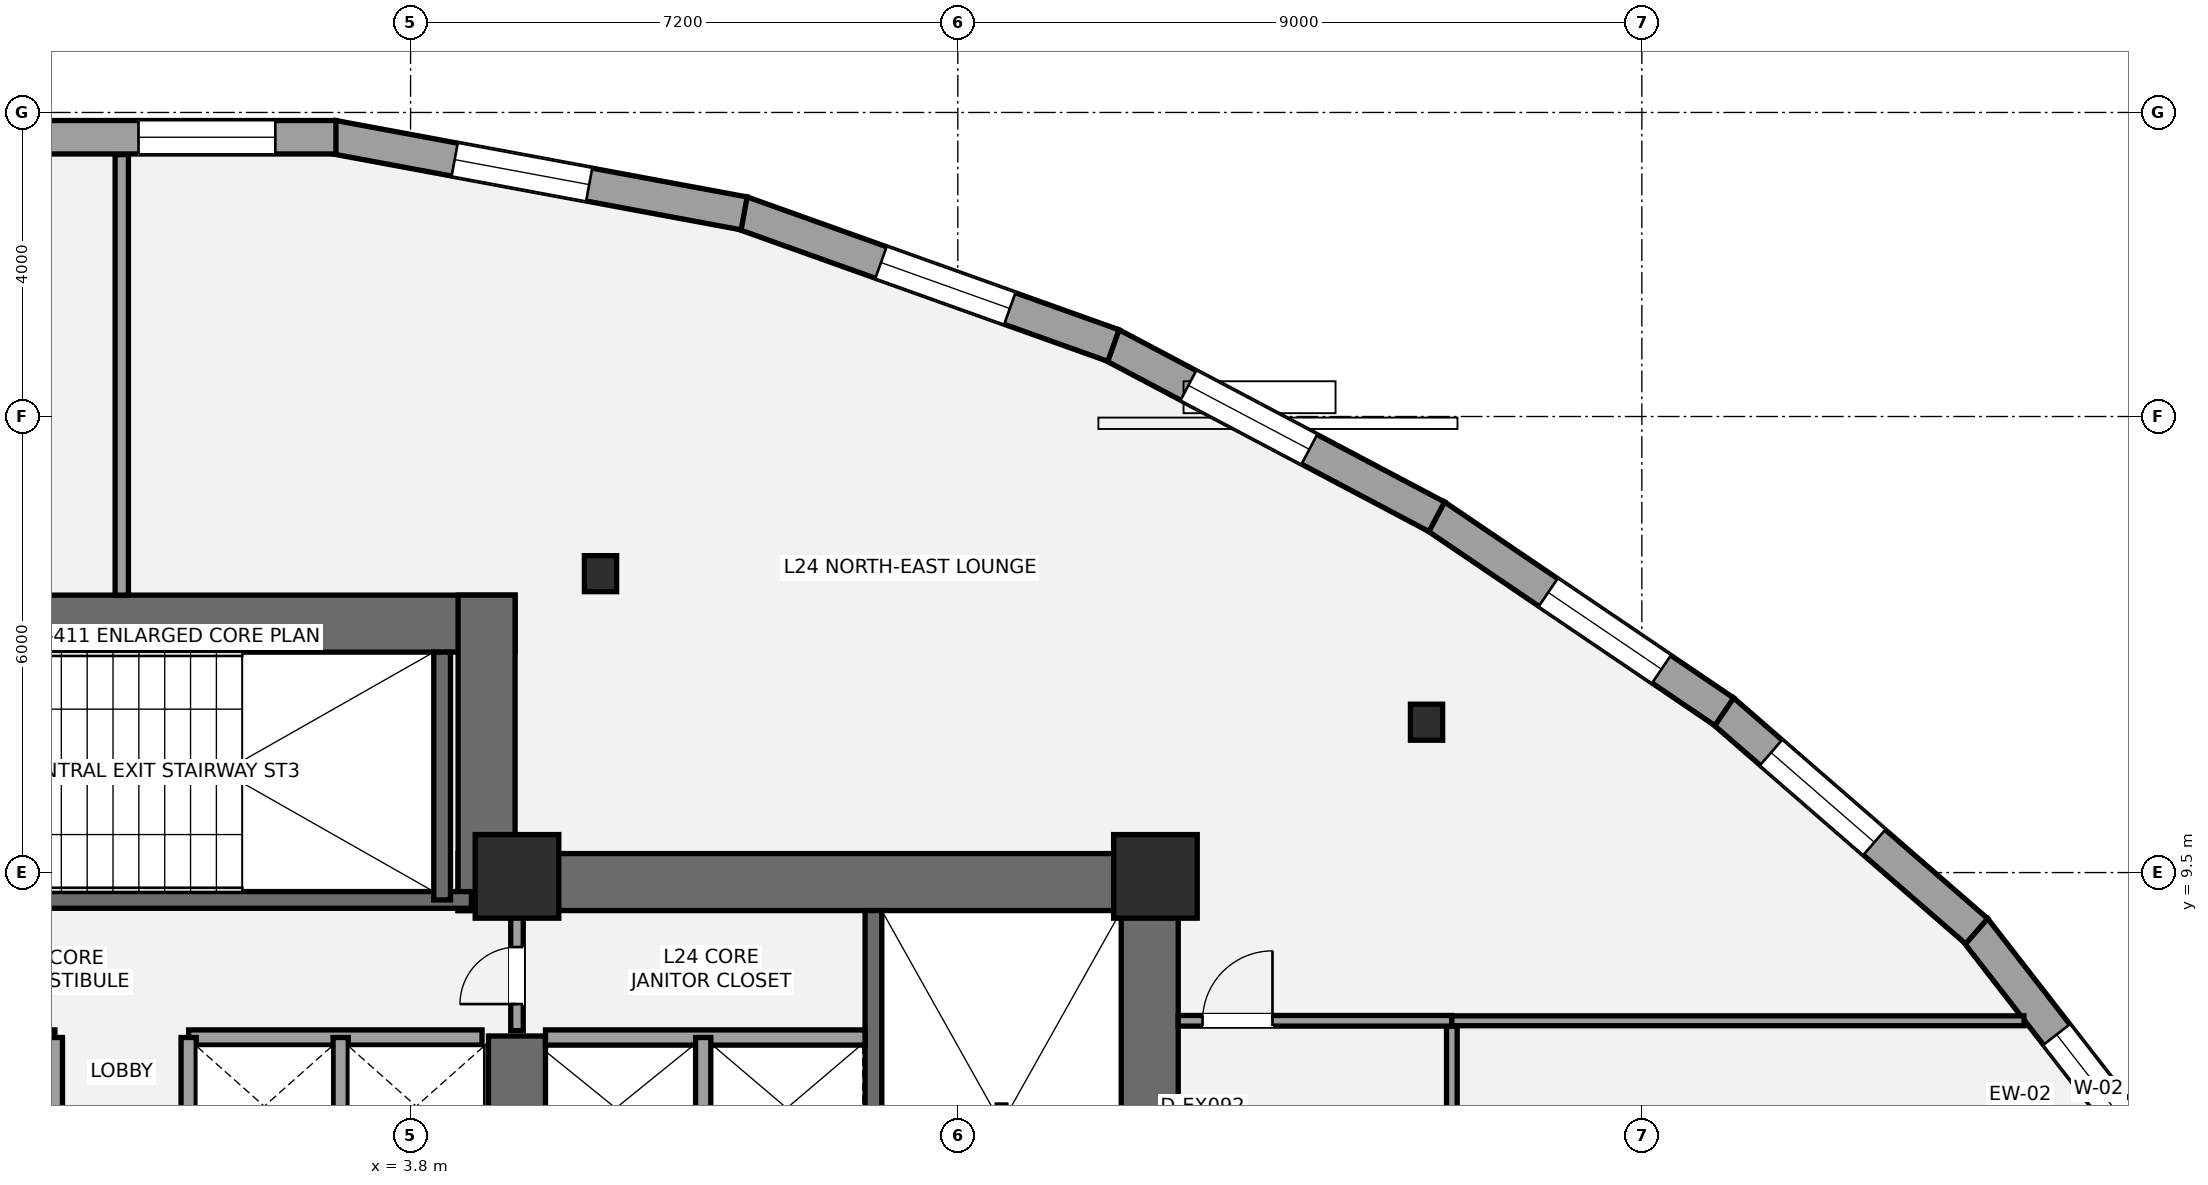
"""IFC4 building model, lengths in metres.
Left out: names, types, materials, properties, quantities, classifications, styles, units other than length and angle.
Written with IfcOpenShell. Run it as: python <this file> out.ifc"""

import sys

from ifc_helpers import new_model, si_unit, direction, frame, frame_2d, origin, origin_2d, place, context, subcontext, project, spatial, rectangle, i_section, extrude, element, fill, save


model = new_model("IFC4")
c1 = context("Model", 3, precision=1e-05, world=origin(), true_north=direction((0.0, 1.0)))
c2 = subcontext(c1, "Body", "Model", "MODEL_VIEW")
j1 = project(units=[si_unit("LENGTHUNIT", "METRE"), si_unit("PLANEANGLEUNIT", "RADIAN")], contexts=[c1])
p1 = place(None, origin())
s1 = spatial("IfcSite", under=j1, at=p1, CompositionType="ELEMENT")
p2 = place(p1, origin())
s2 = spatial("IfcBuilding", under=s1, at=p2, CompositionType="ELEMENT")
p3 = place(p2, frame((0.0, 0.0, 93.1)))
s3 = spatial("IfcBuildingStorey", under=s2, at=p3, CompositionType="ELEMENT", Elevation=93.1)
p4 = place(p3, frame((13.525, 1.1, 0.0), z_axis=(0.0, 0.0, 1.0), x_axis=(0.0, 1.0, 0.0)))
e1 = element("IfcWall", 1, at=p4, inside=s3, PredefinedType="SHEAR", context=c2, shape_type="SweptSolid", body=[
    extrude(rectangle(XDim=8.65, YDim=0.75, at=frame_2d((4.325, 0.0))), origin(), (0.0, 0.0, 1.0), 3.5),
])
p5 = place(p3, frame((4.425, 9.375, 0.0), z_axis=(0.0, 0.0, 1.0), x_axis=(1.0, 0.0, 0.0)))
e2 = element("IfcWall", 2, at=p5, inside=s3, PredefinedType="SHEAR", context=c2, shape_type="SweptSolid", body=[
    extrude(rectangle(XDim=9.475, YDim=0.75, at=frame_2d((4.737, 0.0))), origin(), (0.0, 0.0, 1.0), 3.5),
])
p6 = place(p3, frame((5.2, 5.35, 0.0), z_axis=(0.0, 0.0, 1.0), x_axis=(0.0, 1.0, 0.0)))
e3 = element("IfcWall", 3, at=p6, inside=s3, PredefinedType="SHEAR", context=c2, shape_type="SweptSolid", body=[
    extrude(rectangle(XDim=2.0, YDim=0.75, at=frame_2d((1.0, 0.0))), origin(), (0.0, 0.0, 1.0), 3.5),
])
p7 = place(p3, frame((9.89, 1.85, 0.0), z_axis=(0.0, 0.0, 1.0), x_axis=(0.0, 1.0, 0.0)))
e4 = element("IfcWall", 4, at=p7, inside=s3, PredefinedType="SHEAR", context=c2, shape_type="SweptSolid", body=[
    extrude(rectangle(XDim=7.15, YDim=0.22, at=frame_2d((3.575, 0.0))), origin(), (0.0, 0.0, 1.0), 3.5),
])
p8 = place(p3, frame((-5.175, 12.775, 0.0), z_axis=(0.0, 0.0, 1.0), x_axis=(1.0, 0.0, 0.0)))
e5 = element("IfcWall", 5, at=p8, inside=s3, PredefinedType="SHEAR", context=c2, shape_type="SweptSolid", body=[
    extrude(rectangle(XDim=10.35, YDim=0.75, at=frame_2d((5.175, 0.0))), origin(), (0.0, 0.0, 1.0), 3.5),
])
p9 = place(p3, frame((4.8, 9.0, 0.0), z_axis=(0.0, 0.0, 1.0), x_axis=(0.0, 1.0, 0.0)))
e6 = element("IfcWall", 6, at=p9, inside=s3, PredefinedType="SHEAR", context=c2, shape_type="SweptSolid", body=[
    extrude(rectangle(XDim=4.15, YDim=0.75, at=frame_2d((2.075, 0.0))), origin(), (0.0, 0.0, 1.0), 3.5),
])
p10 = place(p3, frame((-4.7, 9.14, 0.0), z_axis=(0.0, 0.0, 1.0), x_axis=(1.0, 0.0, 0.0)))
e7 = element("IfcWall", 7, at=p10, inside=s3, PredefinedType="SHEAR", context=c2, shape_type="SweptSolid", body=[
    extrude(rectangle(XDim=9.3, YDim=0.22, at=frame_2d((4.65, 0.0))), origin(), (0.0, 0.0, 1.0), 3.5),
])
p11 = place(p10, frame((1.15, 0.0, 0.0)))
e8 = element("IfcOpeningElement", 8, at=p11, cuts=e7, PredefinedType="OPENING", context=c2, shape_type="SweptSolid", body=[
    extrude(rectangle(XDim=1.05, YDim=2.15, at=frame_2d((0.525, 1.075))), frame((0.0, 0.12, 0.0), z_axis=(0.0, -1.0, 0.0), x_axis=(1.0, 0.0, 0.0)), (0.0, 0.0, 1.0), 0.24),
])
p12 = place(p3, frame((4.215, 9.14, 0.0), z_axis=(0.0, 0.0, 1.0), x_axis=(0.0, 1.0, 0.0)))
e9 = element("IfcWall", 9, at=p12, inside=s3, PredefinedType="SHEAR", context=c2, shape_type="SweptSolid", body=[
    extrude(rectangle(XDim=3.26, YDim=0.22, at=frame_2d((1.63, 0.0))), origin(), (0.0, 0.0, 1.0), 3.5),
])
for number, where, z_axis, x_axis in (
    (10, (5.2, 9.45, 0.0), (0.0, 0.0, 1.0), (1.0, 0.0, 0.0)),
    (11, (13.6, 9.45, 0.0), (0.0, 0.0, 1.0), (1.0, 0.0, 0.0)),
):
    element("IfcColumn", number, at=place(p3, frame(where, z_axis=z_axis, x_axis=x_axis)), inside=s3, PredefinedType="COLUMN", context=c2, shape_type="SweptSolid", body=[
        extrude(rectangle(XDim=1.1, YDim=1.1, at=origin_2d()), origin(), (0.0, 0.0, 1.0), 3.5),
    ])
for number, where, z_axis, x_axis in (
    (12, (17.167, 11.478, 0.0), (0.0, 0.0, 1.0), (1.0, 0.0, 0.0)),
    (13, (6.299, 13.433, 0.0), (0.0, 0.0, 1.0), (1.0, 0.0, 0.0)),
):
    element("IfcColumn", number, at=place(p3, frame(where, z_axis=z_axis, x_axis=x_axis)), inside=s3, PredefinedType="COLUMN", context=c2, shape_type="SweptSolid", body=[
        extrude(i_section(OverallWidth=0.424, OverallDepth=0.474, WebThickness=0.048, FlangeThickness=0.077, at=origin_2d()), origin(), (0.0, 0.0, 1.0), 3.5),
    ])
p13 = place(p3, frame((24.376, 8.76, 0.0), z_axis=(0.0, 0.0, 1.0), x_axis=(0.61375552181, -0.789496142769, 0.0)))
e14 = element("IfcWall", 14, at=p13, inside=s3, PredefinedType="STANDARD", context=c2, shape_type="SweptSolid", body=[
    extrude(rectangle(XDim=4.201, YDim=0.44, at=frame_2d((2.101, 0.0))), origin(), (0.0, 0.0, 1.0), 2.528),
])
p14 = place(p13, frame((1.762, 0.0, 0.65)))
e15 = element("IfcOpeningElement", 15, at=p14, cuts=e14, PredefinedType="OPENING", context=c2, shape_type="SweptSolid", body=[
    extrude(rectangle(XDim=1.8, YDim=1.7, at=frame_2d((0.9, 0.85))), frame((0.0, 0.23, 0.0), z_axis=(0.0, -1.0, 0.0), x_axis=(1.0, 0.0, 0.0)), (0.0, 0.0, 1.0), 0.46),
])
p15 = place(p3, frame((21.063, 11.632, 0.0), z_axis=(0.0, 0.0, 1.0), x_axis=(0.754922454992, -0.655814064312, 0.0)))
e16 = element("IfcWall", 16, at=p15, inside=s3, PredefinedType="STANDARD", context=c2, shape_type="SweptSolid", body=[
    extrude(rectangle(XDim=4.427, YDim=0.44, at=frame_2d((2.213, 0.0))), origin(), (0.0, 0.0, 1.0), 2.528),
])
p16 = place(p15, frame((0.843, 0.0, 0.65)))
e17 = element("IfcOpeningElement", 17, at=p16, cuts=e16, PredefinedType="OPENING", context=c2, shape_type="SweptSolid", body=[
    extrude(rectangle(XDim=1.8, YDim=1.7, at=frame_2d((0.9, 0.85))), frame((0.0, 0.23, 0.0), z_axis=(0.0, -1.0, 0.0), x_axis=(1.0, 0.0, 0.0)), (0.0, 0.0, 1.0), 0.46),
])
p17 = place(p3, frame((17.281, 14.193, 0.0), z_axis=(0.0, 0.0, 1.0), x_axis=(0.827749911298, -0.561097214701, 0.0)))
e18 = element("IfcWall", 18, at=p17, inside=s3, PredefinedType="STANDARD", context=c2, shape_type="SweptSolid", body=[
    extrude(rectangle(XDim=4.594, YDim=0.44, at=frame_2d((2.297, 0.0))), origin(), (0.0, 0.0, 1.0), 2.528),
])
p18 = place(p17, frame((1.796, 0.0, 0.65)))
e19 = element("IfcOpeningElement", 19, at=p18, cuts=e18, PredefinedType="OPENING", context=c2, shape_type="SweptSolid", body=[
    extrude(rectangle(XDim=1.8, YDim=1.7, at=frame_2d((0.9, 0.85))), frame((0.0, 0.23, 0.0), z_axis=(0.0, -1.0, 0.0), x_axis=(1.0, 0.0, 0.0)), (0.0, 0.0, 1.0), 0.46),
])
p19 = place(p3, frame((13.019, 16.446, 0.0), z_axis=(0.0, 0.0, 1.0), x_axis=(0.88395333318, -0.467575132743, 0.0)))
e20 = element("IfcWall", 20, at=p19, inside=s3, PredefinedType="STANDARD", context=c2, shape_type="SweptSolid", body=[
    extrude(rectangle(XDim=4.845, YDim=0.44, at=frame_2d((2.422, 0.0))), origin(), (0.0, 0.0, 1.0), 2.528),
])
p20 = place(p19, frame((1.148, 0.0, 0.65)))
e21 = element("IfcOpeningElement", 21, at=p20, cuts=e20, PredefinedType="OPENING", context=c2, shape_type="SweptSolid", body=[
    extrude(rectangle(XDim=1.8, YDim=1.7, at=frame_2d((0.9, 0.85))), frame((0.0, 0.23, 0.0), z_axis=(0.0, -1.0, 0.0), x_axis=(1.0, 0.0, 0.0)), (0.0, 0.0, 1.0), 0.46),
])
p21 = place(p3, frame((8.155, 18.181, 0.0), z_axis=(0.0, 0.0, 1.0), x_axis=(0.941734469447, -0.336357234285, 0.0)))
e22 = element("IfcWall", 22, at=p21, inside=s3, PredefinedType="STANDARD", context=c2, shape_type="SweptSolid", body=[
    extrude(rectangle(XDim=5.196, YDim=0.44, at=frame_2d((2.598, 0.0))), origin(), (0.0, 0.0, 1.0), 2.528),
])
p22 = place(p21, frame((1.948, 0.0, 0.65)))
e23 = element("IfcOpeningElement", 23, at=p22, cuts=e22, PredefinedType="OPENING", context=c2, shape_type="SweptSolid", body=[
    extrude(rectangle(XDim=1.8, YDim=1.7, at=frame_2d((0.9, 0.85))), frame((0.0, 0.23, 0.0), z_axis=(0.0, -1.0, 0.0), x_axis=(1.0, 0.0, 0.0)), (0.0, 0.0, 1.0), 0.46),
])
p23 = place(p3, frame((2.778, 19.177, 0.0), z_axis=(0.0, 0.0, 1.0), x_axis=(0.983175651308, -0.182662636232, 0.0)))
e24 = element("IfcWall", 24, at=p23, inside=s3, PredefinedType="STANDARD", context=c2, shape_type="SweptSolid", body=[
    extrude(rectangle(XDim=5.504, YDim=0.44, at=frame_2d((2.752, 0.0))), origin(), (0.0, 0.0, 1.0), 2.528),
])
p24 = place(p23, frame((1.63, 0.0, 0.65)))
e25 = element("IfcOpeningElement", 25, at=p24, cuts=e24, PredefinedType="OPENING", context=c2, shape_type="SweptSolid", body=[
    extrude(rectangle(XDim=1.8, YDim=1.7, at=frame_2d((0.9, 0.85))), frame((0.0, 0.23, 0.0), z_axis=(0.0, -1.0, 0.0), x_axis=(1.0, 0.0, 0.0)), (0.0, 0.0, 1.0), 0.46),
])
p25 = place(p3, frame((-2.818, 19.174, 0.0), z_axis=(0.0, 0.0, 1.0), x_axis=(1.0, 0.0, 0.0)))
e26 = element("IfcWall", 26, at=p25, inside=s3, PredefinedType="STANDARD", context=c2, shape_type="SweptSolid", body=[
    extrude(rectangle(XDim=5.636, YDim=0.44, at=frame_2d((2.818, 0.0))), origin(), (0.0, 0.0, 1.0), 2.528),
])
p26 = place(p25, frame((3.038, 0.0, 0.65)))
e27 = element("IfcOpeningElement", 27, at=p26, cuts=e26, PredefinedType="OPENING", context=c2, shape_type="SweptSolid", body=[
    extrude(rectangle(XDim=1.8, YDim=1.7, at=frame_2d((0.9, 0.85))), frame((0.0, 0.23, 0.0), z_axis=(0.0, -1.0, 0.0), x_axis=(1.0, 0.0, 0.0)), (0.0, 0.0, 1.0), 0.46),
])
p27 = place(p3, frame((5.575, 7.33, 0.0), z_axis=(0.0, 0.0, 1.0), x_axis=(1.0, 0.0, 0.0)))
e28 = element("IfcWall", 28, at=p27, inside=s3, PredefinedType="SOLIDWALL", context=c2, shape_type="SweptSolid", body=[
    extrude(rectangle(XDim=4.205, YDim=0.2, at=frame_2d((2.103, 0.0))), origin(), (0.0, 0.0, 1.0), 3.31),
])
p28 = place(p3, frame((7.65, 5.47, 0.0), z_axis=(0.0, 0.0, 1.0), x_axis=(0.0, 1.0, 0.0)))
e29 = element("IfcWall", 29, at=p28, inside=s3, PredefinedType="SOLIDWALL", context=c2, shape_type="SweptSolid", body=[
    extrude(rectangle(XDim=1.86, YDim=0.2, at=frame_2d((0.93, 0.0))), origin(), (0.0, 0.0, 1.0), 3.31),
])
for number, where, z_axis, x_axis in (
    (30, (-4.74, 7.33, 0.0), (0.0, 0.0, 1.0), (1.0, 0.0, 0.0)),
    (31, (0.88, 7.33, 0.0), (0.0, 0.0, 1.0), (1.0, 0.0, 0.0)),
):
    element("IfcWall", number, at=place(p3, frame(where, z_axis=z_axis, x_axis=x_axis)), inside=s3, PredefinedType="SOLIDWALL", context=c2, shape_type="SweptSolid", body=[
        extrude(rectangle(XDim=3.86, YDim=0.2, at=frame_2d((1.93, 0.0))), origin(), (0.0, 0.0, 1.0), 3.31),
    ])
for number, where, z_axis, x_axis in (
    (32, (2.88, 5.52, 0.0), (0.0, 0.0, 1.0), (0.0, 1.0, 0.0)),
    (33, (-0.88, 5.52, 0.0), (0.0, 0.0, 1.0), (0.0, 1.0, 0.0)),
    (34, (0.88, 5.52, 0.0), (0.0, 0.0, 1.0), (0.0, 1.0, 0.0)),
):
    element("IfcWall", number, at=place(p3, frame(where, z_axis=z_axis, x_axis=x_axis)), inside=s3, PredefinedType="SOLIDWALL", context=c2, shape_type="SweptSolid", body=[
        extrude(rectangle(XDim=1.81, YDim=0.2, at=frame_2d((0.905, 0.0))), origin(), (0.0, 0.0, 1.0), 3.31),
    ])
p29 = place(p3, frame((5.2, 7.42, 0.0), z_axis=(0.0, 0.0, 1.0), x_axis=(0.0, 1.0, 0.0)))
e35 = element("IfcWall", 35, at=p29, inside=s3, PredefinedType="PARTITIONING", context=c2, shape_type="SweptSolid", body=[
    extrude(rectangle(XDim=1.58, YDim=0.165, at=frame_2d((0.79, 0.0))), origin(), (0.0, 0.0, 1.0), 3.31),
])
p30 = place(p29, frame((0.35, 0.0, 0.0)))
e36 = element("IfcOpeningElement", 36, at=p30, cuts=e35, PredefinedType="OPENING", context=c2, shape_type="SweptSolid", body=[
    extrude(rectangle(XDim=0.75, YDim=2.1, at=frame_2d((0.375, 1.05))), frame((0.0, 0.093, 0.0), z_axis=(0.0, -1.0, 0.0), x_axis=(1.0, 0.0, 0.0)), (0.0, 0.0, 1.0), 0.185),
])
p31 = place(p3, frame((17.5, -13.77, 0.0), z_axis=(0.0, 0.0, 1.0), x_axis=(0.0, 1.0, 0.0)))
e37 = element("IfcWall", 37, at=p31, inside=s3, PredefinedType="PARTITIONING", context=c2, shape_type="SweptSolid", body=[
    extrude(rectangle(XDim=21.32, YDim=0.14, at=frame_2d((10.66, 0.0))), origin(), (0.0, 0.0, 1.0), 2.688),
])
p32 = place(p31, frame((10.969, 0.0, 0.0)))
e38 = element("IfcOpeningElement", 38, at=p32, cuts=e37, PredefinedType="OPENING", context=c2, shape_type="SweptSolid", body=[
    extrude(rectangle(XDim=0.9, YDim=2.1, at=frame_2d((0.45, 1.05))), frame((0.0, 0.08, 0.0), z_axis=(0.0, -1.0, 0.0), x_axis=(1.0, 0.0, 0.0)), (0.0, 0.0, 1.0), 0.16),
])
p33 = place(p31, frame((18.195, 0.0, 0.0)))
e39 = element("IfcOpeningElement", 39, at=p33, cuts=e37, PredefinedType="OPENING", context=c2, shape_type="SweptSolid", body=[
    extrude(rectangle(XDim=0.9, YDim=2.1, at=frame_2d((0.45, 1.05))), frame((0.0, 0.08, 0.0), z_axis=(0.0, -1.0, 0.0), x_axis=(1.0, 0.0, 0.0)), (0.0, 0.0, 1.0), 0.16),
])
p34 = place(p3, frame((13.9, 7.55, 0.0), z_axis=(0.0, 0.0, 1.0), x_axis=(1.0, 0.0, 0.0)))
e40 = element("IfcWall", 40, at=p34, inside=s3, PredefinedType="PARTITIONING", context=c2, shape_type="SweptSolid", body=[
    extrude(rectangle(XDim=3.6, YDim=0.14, at=frame_2d((1.8, 0.0))), origin(), (0.0, 0.0, 1.0), 2.763),
])
p35 = place(p34, frame((0.32, 0.0, 0.0)))
e41 = element("IfcOpeningElement", 41, at=p35, cuts=e40, PredefinedType="OPENING", context=c2, shape_type="SweptSolid", body=[
    extrude(rectangle(XDim=0.92, YDim=2.15, at=frame_2d((0.46, 1.075))), frame((0.0, 0.08, 0.0), z_axis=(0.0, -1.0, 0.0), x_axis=(1.0, 0.0, 0.0)), (0.0, 0.0, 1.0), 0.16),
])
p36 = place(p3, frame((0.0, 13.15, 0.0), z_axis=(0.0, 0.0, 1.0), x_axis=(0.0, 1.0, 0.0)))
e42 = element("IfcWall", 42, at=p36, inside=s3, PredefinedType="PARTITIONING", context=c2, shape_type="SweptSolid", body=[
    extrude(rectangle(XDim=5.796, YDim=0.175, at=frame_2d((2.898, 0.0))), origin(), (0.0, 0.0, 1.0), 3.31),
])
p37 = place(p3, frame((17.5, 7.55, 0.0), z_axis=(0.0, 0.0, 1.0), x_axis=(1.0, 0.0, 0.0)))
e43 = element("IfcWall", 43, at=p37, inside=s3, PredefinedType="PARTITIONING", context=c2, shape_type="SweptSolid", body=[
    extrude(rectangle(XDim=7.527, YDim=0.13, at=frame_2d((3.764, 0.0))), origin(), (0.0, 0.0, 1.0), 3.31),
])
p38 = place(p14, origin())
e44 = element("IfcWindow", 44, at=p38, inside=s3, PartitioningType="SINGLE_PANEL", PredefinedType="WINDOW", context=c2, shape_type="SweptSolid", body=[
    extrude(rectangle(XDim=1.8, YDim=1.7, at=frame_2d((0.9, 0.85))), frame((0.0, -0.01, 0.0), z_axis=(0.0, -1.0, 0.0), x_axis=(1.0, 0.0, 0.0)), (0.0, 0.0, 1.0), 0.06),
])
fill(e15, e44)
p39 = place(p16, origin())
e45 = element("IfcWindow", 45, at=p39, inside=s3, PartitioningType="SINGLE_PANEL", PredefinedType="WINDOW", context=c2, shape_type="SweptSolid", body=[
    extrude(rectangle(XDim=1.8, YDim=1.7, at=frame_2d((0.9, 0.85))), frame((0.0, -0.01, 0.0), z_axis=(0.0, -1.0, 0.0), x_axis=(1.0, 0.0, 0.0)), (0.0, 0.0, 1.0), 0.06),
])
fill(e17, e45)
p40 = place(p18, origin())
e46 = element("IfcWindow", 46, at=p40, inside=s3, PartitioningType="SINGLE_PANEL", PredefinedType="WINDOW", context=c2, shape_type="SweptSolid", body=[
    extrude(rectangle(XDim=1.8, YDim=1.7, at=frame_2d((0.9, 0.85))), frame((0.0, -0.01, 0.0), z_axis=(0.0, -1.0, 0.0), x_axis=(1.0, 0.0, 0.0)), (0.0, 0.0, 1.0), 0.06),
])
fill(e19, e46)
p41 = place(p20, origin())
e47 = element("IfcWindow", 47, at=p41, inside=s3, PartitioningType="SINGLE_PANEL", PredefinedType="WINDOW", context=c2, shape_type="SweptSolid", body=[
    extrude(rectangle(XDim=1.8, YDim=1.7, at=frame_2d((0.9, 0.85))), frame((0.0, -0.01, 0.0), z_axis=(0.0, -1.0, 0.0), x_axis=(1.0, 0.0, 0.0)), (0.0, 0.0, 1.0), 0.06),
])
fill(e21, e47)
p42 = place(p22, origin())
e48 = element("IfcWindow", 48, at=p42, inside=s3, PartitioningType="SINGLE_PANEL", PredefinedType="WINDOW", context=c2, shape_type="SweptSolid", body=[
    extrude(rectangle(XDim=1.8, YDim=1.7, at=frame_2d((0.9, 0.85))), frame((0.0, -0.01, 0.0), z_axis=(0.0, -1.0, 0.0), x_axis=(1.0, 0.0, 0.0)), (0.0, 0.0, 1.0), 0.06),
])
fill(e23, e48)
p43 = place(p24, origin())
e49 = element("IfcWindow", 49, at=p43, inside=s3, PartitioningType="SINGLE_PANEL", PredefinedType="WINDOW", context=c2, shape_type="SweptSolid", body=[
    extrude(rectangle(XDim=1.8, YDim=1.7, at=frame_2d((0.9, 0.85))), frame((0.0, -0.01, 0.0), z_axis=(0.0, -1.0, 0.0), x_axis=(1.0, 0.0, 0.0)), (0.0, 0.0, 1.0), 0.06),
])
fill(e25, e49)
p44 = place(p26, origin())
e50 = element("IfcWindow", 50, at=p44, inside=s3, PartitioningType="SINGLE_PANEL", PredefinedType="WINDOW", context=c2, shape_type="SweptSolid", body=[
    extrude(rectangle(XDim=1.8, YDim=1.7, at=frame_2d((0.9, 0.85))), frame((0.0, -0.01, 0.0), z_axis=(0.0, -1.0, 0.0), x_axis=(1.0, 0.0, 0.0)), (0.0, 0.0, 1.0), 0.06),
])
fill(e27, e50)
p45 = place(p30, origin())
e51 = element("IfcDoor", 51, at=p45, inside=s3, OperationType="SINGLE_SWING_LEFT", PredefinedType="DOOR", context=c2, shape_type="SweptSolid", body=[
    extrude(rectangle(XDim=0.75, YDim=2.1, at=frame_2d((0.375, 1.05))), frame((0.0, 0.025, 0.0), z_axis=(0.0, -1.0, 0.0), x_axis=(1.0, 0.0, 0.0)), (0.0, 0.0, 1.0), 0.05),
])
fill(e36, e51)
p46 = place(p35, origin())
e52 = element("IfcDoor", 52, at=p46, inside=s3, OperationType="SINGLE_SWING_RIGHT", PredefinedType="DOOR", context=c2, shape_type="SweptSolid", body=[
    extrude(rectangle(XDim=0.92, YDim=2.15, at=frame_2d((0.46, 1.075))), frame((0.0, 0.025, 0.0), z_axis=(0.0, -1.0, 0.0), x_axis=(1.0, 0.0, 0.0)), (0.0, 0.0, 1.0), 0.05),
])
fill(e41, e52)
save(model, sys.argv[1])
